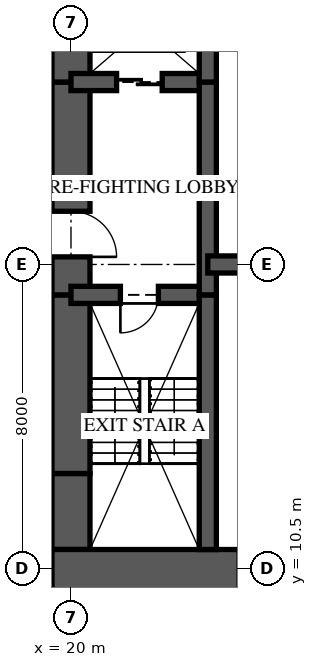
"""IFC4 building model, lengths in metres.
Left out: names, types, materials, properties, quantities, classifications, styles, units other than length and angle.
Written with IfcOpenShell. Run it as: python <this file> out.ifc"""

import sys

from ifc_helpers import new_model, si_unit, direction, frame, frame_2d, origin, place, context, subcontext, project, spatial, rectangle, extrude, element, fill, save


model = new_model("IFC4")
c1 = context("Model", 3, precision=1e-05, world=origin(), true_north=direction((0.0, 1.0)))
c2 = subcontext(c1, "Body", "Model", "MODEL_VIEW")
j1 = project(units=[si_unit("LENGTHUNIT", "METRE"), si_unit("PLANEANGLEUNIT", "RADIAN")], contexts=[c1])
p1 = place(None, origin())
s1 = spatial("IfcSite", under=j1, at=p1, CompositionType="ELEMENT")
p2 = place(p1, origin())
s2 = spatial("IfcBuilding", under=s1, at=p2, CompositionType="ELEMENT")
p3 = place(p2, frame((0.0, 0.0, 11.0)))
s3 = spatial("IfcBuildingStorey", under=s2, at=p3, CompositionType="ELEMENT", Elevation=11.0)
p4 = place(p3, frame((19.5, 10.125, 0.0), z_axis=(0.0, 0.0, 1.0), x_axis=(1.0, 0.0, 0.0)))
e1 = element("IfcWall", 1, at=p4, inside=s3, PredefinedType="SHEAR", context=c2, shape_type="SweptSolid", body=[
    extrude(rectangle(XDim=6.5, YDim=1.75, at=frame_2d((3.25, 0.0))), origin(), (0.0, 0.0, 1.0), 5.0),
])
p5 = place(p4, frame((4.925, 0.0, 0.0)))
e2 = element("IfcOpeningElement", 2, at=p5, cuts=e1, PredefinedType="OPENING", context=c2, shape_type="SweptSolid", body=[
    extrude(rectangle(XDim=0.75, YDim=2.1, at=frame_2d((0.375, 1.05))), frame((0.0, 0.885, 0.0), z_axis=(0.0, -1.0, 0.0), x_axis=(1.0, 0.0, 0.0)), (0.0, 0.0, 1.0), 1.77),
])
p6 = place(p3, frame((20.0, 26.0, 0.0), z_axis=(0.0, 0.0, 1.0), x_axis=(0.0, -1.0, 0.0)))
e3 = element("IfcWall", 3, at=p6, inside=s3, PredefinedType="SHEAR", context=c2, shape_type="SweptSolid", body=[
    extrude(rectangle(XDim=2.7, YDim=1.0, at=frame_2d((1.35, 0.0))), origin(), (0.0, 0.0, 1.0), 5.0),
])
p7 = place(p3, frame((20.0, 23.3, 0.0), z_axis=(0.0, 0.0, 1.0), x_axis=(0.0, -1.0, 0.0)))
e4 = element("IfcWall", 4, at=p7, inside=s3, PredefinedType="SHEAR", context=c2, shape_type="SweptSolid", body=[
    extrude(rectangle(XDim=5.6, YDim=1.0, at=frame_2d((2.8, 0.0))), origin(), (0.0, 0.0, 1.0), 5.0),
])
p8 = place(p7, frame((3.4, 0.0, 0.0)))
e5 = element("IfcOpeningElement", 5, at=p8, cuts=e4, PredefinedType="OPENING", context=c2, shape_type="SweptSolid", body=[
    extrude(rectangle(XDim=1.2, YDim=2.2, at=frame_2d((0.6, 1.1))), frame((0.0, 0.51, 0.0), z_axis=(0.0, -1.0, 0.0), x_axis=(1.0, 0.0, 0.0)), (0.0, 0.0, 1.0), 1.02),
])
p9 = place(p3, frame((20.0, 17.7, 0.0), z_axis=(0.0, 0.0, 1.0), x_axis=(0.0, -1.0, 0.0)))
e6 = element("IfcWall", 6, at=p9, inside=s3, PredefinedType="SHEAR", context=c2, shape_type="SweptSolid", body=[
    extrude(rectangle(XDim=4.7, YDim=1.0, at=frame_2d((2.35, 0.0))), origin(), (0.0, 0.0, 1.0), 5.0),
])
p10 = place(p3, frame((20.0, 13.0, 0.0), z_axis=(0.0, 0.0, 1.0), x_axis=(0.0, -1.0, 0.0)))
e7 = element("IfcWall", 7, at=p10, inside=s3, PredefinedType="SHEAR", context=c2, shape_type="SweptSolid", body=[
    extrude(rectangle(XDim=2.0, YDim=1.0, at=frame_2d((1.0, 0.0))), origin(), (0.0, 0.0, 1.0), 5.0),
])
p11 = place(p3, frame((23.6, 11.0, 0.0), z_axis=(0.0, 0.0, 1.0), x_axis=(0.0, 1.0, 0.0)))
e8 = element("IfcWall", 8, at=p11, inside=s3, PredefinedType="SHEAR", context=c2, shape_type="SweptSolid", body=[
    extrude(rectangle(XDim=6.7, YDim=0.45, at=frame_2d((3.35, 0.0))), origin(), (0.0, 0.0, 1.0), 5.0),
])
p12 = place(p3, frame((23.6, 17.7, 0.0), z_axis=(0.0, 0.0, 1.0), x_axis=(0.0, 1.0, 0.0)))
e9 = element("IfcWall", 9, at=p12, inside=s3, PredefinedType="SHEAR", context=c2, shape_type="SweptSolid", body=[
    extrude(rectangle(XDim=5.6, YDim=0.45, at=frame_2d((2.8, 0.0))), origin(), (0.0, 0.0, 1.0), 5.0),
])
p13 = place(p3, frame((23.6, 23.3, 0.0), z_axis=(0.0, 0.0, 1.0), x_axis=(0.0, 1.0, 0.0)))
e10 = element("IfcWall", 10, at=p13, inside=s3, PredefinedType="SHEAR", context=c2, shape_type="SweptSolid", body=[
    extrude(rectangle(XDim=2.7, YDim=0.45, at=frame_2d((1.35, 0.0))), origin(), (0.0, 0.0, 1.0), 5.0),
])
p14 = place(p3, frame((20.0, 17.7, 0.0), z_axis=(0.0, 0.0, 1.0), x_axis=(1.0, 0.0, 0.0)))
e11 = element("IfcWall", 11, at=p14, inside=s3, PredefinedType="SHEAR", context=c2, shape_type="SweptSolid", body=[
    extrude(rectangle(XDim=3.6, YDim=0.45, at=frame_2d((1.8, 0.0))), origin(), (0.0, 0.0, 1.0), 5.0),
])
p15 = place(p14, frame((1.3, 0.0, 0.0)))
e12 = element("IfcOpeningElement", 12, at=p15, cuts=e11, PredefinedType="OPENING", context=c2, shape_type="SweptSolid", body=[
    extrude(rectangle(XDim=1.0, YDim=2.1, at=frame_2d((0.5, 1.05))), frame((0.0, 0.235, 0.0), z_axis=(0.0, -1.0, 0.0), x_axis=(1.0, 0.0, 0.0)), (0.0, 0.0, 1.0), 0.47),
])
p16 = place(p3, frame((20.0, 23.3, 0.0), z_axis=(0.0, 0.0, 1.0), x_axis=(1.0, 0.0, 0.0)))
e13 = element("IfcWall", 13, at=p16, inside=s3, PredefinedType="SHEAR", context=c2, shape_type="SweptSolid", body=[
    extrude(rectangle(XDim=3.6, YDim=0.45, at=frame_2d((1.8, 0.0))), origin(), (0.0, 0.0, 1.0), 5.0),
])
p17 = place(p16, frame((1.2, 0.0, 0.0)))
e14 = element("IfcOpeningElement", 14, at=p17, cuts=e13, PredefinedType="OPENING", context=c2, shape_type="SweptSolid", body=[
    extrude(rectangle(XDim=1.2, YDim=2.1, at=frame_2d((0.6, 1.05))), frame((0.0, 0.235, 0.0), z_axis=(0.0, -1.0, 0.0), x_axis=(1.0, 0.0, 0.0)), (0.0, 0.0, 1.0), 0.47),
])
p18 = place(p3, frame((23.6, 18.5, 0.0), z_axis=(0.0, 0.0, 1.0), x_axis=(1.0, 0.0, 0.0)))
e15 = element("IfcWall", 15, at=p18, inside=s3, PredefinedType="SHEAR", context=c2, shape_type="SweptSolid", body=[
    extrude(rectangle(XDim=2.4, YDim=0.45, at=frame_2d((1.2, 0.0))), origin(), (0.0, 0.0, 1.0), 5.0),
])
p19 = place(p15, frame((1.0, 0.0, 0.0), z_axis=(0.0, 0.0, 1.0), x_axis=(-1.0, 0.0, 0.0)))
e16 = element("IfcDoor", 16, at=p19, inside=s3, OperationType="SINGLE_SWING_RIGHT", PredefinedType="DOOR", context=c2, shape_type="SweptSolid", body=[
    extrude(rectangle(XDim=1.0, YDim=2.1, at=frame_2d((0.5, 1.05))), frame((0.0, 0.025, 0.0), z_axis=(0.0, -1.0, 0.0), x_axis=(1.0, 0.0, 0.0)), (0.0, 0.0, 1.0), 0.05),
])
fill(e12, e16)
p20 = place(p8, origin())
e17 = element("IfcDoor", 17, at=p20, inside=s3, OperationType="SINGLE_SWING_RIGHT", PredefinedType="DOOR", context=c2, shape_type="SweptSolid", body=[
    extrude(rectangle(XDim=1.2, YDim=2.2, at=frame_2d((0.6, 1.1))), frame((0.0, 0.025, 0.0), z_axis=(0.0, -1.0, 0.0), x_axis=(1.0, 0.0, 0.0)), (0.0, 0.0, 1.0), 0.05),
])
fill(e5, e17)
p21 = place(p17, origin())
e18 = element("IfcDoor", 18, at=p21, inside=s3, OperationType="SLIDING_TO_LEFT", PredefinedType="DOOR", context=c2, shape_type="SweptSolid", body=[
    extrude(rectangle(XDim=1.2, YDim=2.1, at=frame_2d((0.6, 1.05))), frame((0.0, 0.025, 0.0), z_axis=(0.0, -1.0, 0.0), x_axis=(1.0, 0.0, 0.0)), (0.0, 0.0, 1.0), 0.05),
])
fill(e14, e18)
save(model, sys.argv[1])
